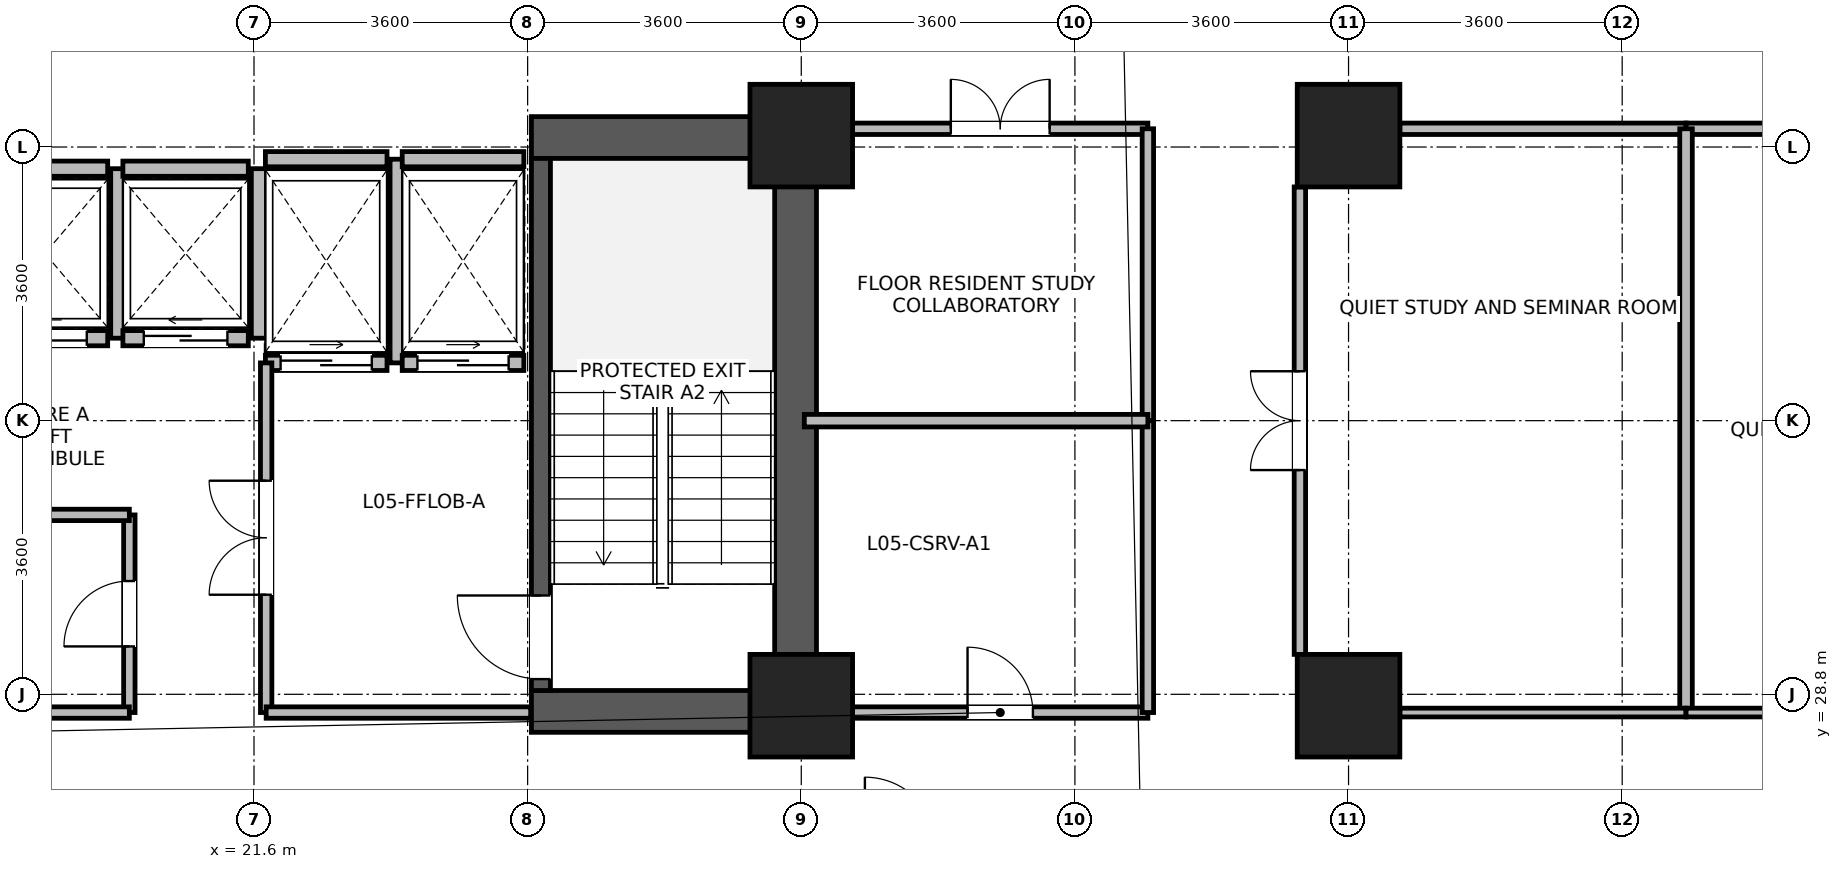
"""IFC4 building model, lengths in metres.
Left out: names, types, materials, properties, quantities, classifications, styles, units other than length and angle.
Written with IfcOpenShell. Run it as: python <this file> out.ifc"""

import sys

from ifc_helpers import new_model, si_unit, direction, frame, frame_2d, origin, origin_2d, place, context, subcontext, project, spatial, rectangle, extrude, source, transform, mapped, element, fill, save


model = new_model("IFC4")
c1 = context("Model", 3, precision=1e-05, world=origin(), true_north=direction((0.0, 1.0)))
c2 = subcontext(c1, "Body", "Model", "MODEL_VIEW")
j1 = project(units=[si_unit("LENGTHUNIT", "METRE"), si_unit("PLANEANGLEUNIT", "RADIAN")], contexts=[c1])
p1 = place(None, origin())
s1 = spatial("IfcSite", under=j1, at=p1, CompositionType="ELEMENT")
p2 = place(p1, origin())
s2 = spatial("IfcBuilding", under=s1, at=p2, CompositionType="ELEMENT")
p3 = place(p2, frame((0.0, 0.0, 25.3)))
s3 = spatial("IfcBuildingStorey", under=s2, at=p3, CompositionType="ELEMENT", Elevation=25.3)
p4 = place(p3, frame((28.725, 28.3, 0.0), z_axis=(0.0, 0.0, 1.0), x_axis=(0.0, 1.0, 0.0)))
e1 = element("IfcWall", 1, at=p4, inside=s3, PredefinedType="SHEAR", context=c2, shape_type="SweptSolid", body=[
    extrude(rectangle(XDim=8.1, YDim=0.55, at=frame_2d((4.05, 0.0))), origin(), (0.0, 0.0, 1.0), 3.45),
])
for number, where, z_axis, x_axis in (
    (2, (25.25, 28.575, 0.0), (0.0, 0.0, 1.0), (1.0, 0.0, 0.0)),
    (3, (25.25, 36.125, 0.0), (0.0, 0.0, 1.0), (1.0, 0.0, 0.0)),
):
    element("IfcWall", number, at=place(p3, frame(where, z_axis=z_axis, x_axis=x_axis)), inside=s3, PredefinedType="SHEAR", context=c2, shape_type="SweptSolid", body=[
        extrude(rectangle(XDim=3.2, YDim=0.55, at=frame_2d((1.6, 0.0))), origin(), (0.0, 0.0, 1.0), 3.45),
    ])
p5 = place(p3, frame((25.375, 28.85, 0.0), z_axis=(0.0, 0.0, 1.0), x_axis=(0.0, 1.0, 0.0)))
e4 = element("IfcWall", 4, at=p5, inside=s3, PredefinedType="SHEAR", context=c2, shape_type="SweptSolid", body=[
    extrude(rectangle(XDim=7.0, YDim=0.25, at=frame_2d((3.5, 0.0))), origin(), (0.0, 0.0, 1.0), 3.45),
])
p6 = place(p5, frame((0.15, 0.0, 0.0)))
e5 = element("IfcOpeningElement", 5, at=p6, cuts=e4, PredefinedType="OPENING", context=c2, shape_type="SweptSolid", body=[
    extrude(rectangle(XDim=1.1, YDim=2.08, at=frame_2d((0.55, 1.04))), frame((0.0, 0.135, 0.0), z_axis=(0.0, -1.0, 0.0), x_axis=(1.0, 0.0, 0.0)), (0.0, 0.0, 1.0), 0.27),
])
m1 = source(origin(), c2, "Body", "SweptSolid", [
    extrude(rectangle(XDim=1.35, YDim=1.35, at=origin_2d()), origin(), (0.0, 0.0, 1.0), 3.7),
])
for number, where, z_axis, x_axis in (
    (6, (28.8, 28.65, 0.0), (0.0, 0.0, 1.0), (1.0, 0.0, 0.0)),
    (7, (28.8, 36.15, 0.0), (0.0, 0.0, 1.0), (1.0, 0.0, 0.0)),
    (8, (36.0, 28.65, 0.0), (0.0, 0.0, 1.0), (1.0, 0.0, 0.0)),
    (9, (36.0, 36.15, 0.0), (0.0, 0.0, 1.0), (1.0, 0.0, 0.0)),
):
    element("IfcColumn", number, at=place(p3, frame(where, z_axis=z_axis, x_axis=x_axis)), inside=s3, PredefinedType="COLUMN", context=c2, shape_type="MappedRepresentation", body=[
        mapped(m1, transform((0.0, 0.0, 0.0), x_axis=(1.0, 0.0, 0.0), y_axis=(0.0, 1.0, 0.0), z_axis=(0.0, 0.0, 1.0), scale=1.0)),
    ])
p7 = place(p3, frame((18.025, 33.485, 0.0), z_axis=(0.0, 0.0, 1.0), x_axis=(1.0, 0.0, 0.0)))
e10 = element("IfcWall", 10, at=p7, inside=s3, PredefinedType="PARTITIONING", context=c2, shape_type="SweptSolid", body=[
    extrude(rectangle(XDim=1.65, YDim=0.2, at=frame_2d((0.825, 0.0))), origin(), (0.0, 0.0, 1.0), 3.43),
])
p8 = place(p7, frame((0.275, 0.0, 0.0)))
e11 = element("IfcOpeningElement", 11, at=p8, cuts=e10, PredefinedType="OPENING", context=c2, shape_type="SweptSolid", body=[
    extrude(rectangle(XDim=1.1, YDim=2.12, at=frame_2d((0.55, 1.06))), frame((0.0, 0.11, 0.0), z_axis=(0.0, -1.0, 0.0), x_axis=(1.0, 0.0, 0.0)), (0.0, 0.0, 1.0), 0.22),
])
p9 = place(p3, frame((18.025, 35.715, 0.0), z_axis=(0.0, 0.0, 1.0), x_axis=(1.0, 0.0, 0.0)))
e12 = element("IfcWall", 12, at=p9, inside=s3, PredefinedType="PARTITIONING", context=c2, shape_type="SweptSolid", body=[
    extrude(rectangle(XDim=1.65, YDim=0.2, at=frame_2d((0.825, 0.0))), origin(), (0.0, 0.0, 1.0), 2.23),
])
p10 = place(p3, frame((19.815, 33.485, 0.0), z_axis=(0.0, 0.0, 1.0), x_axis=(0.0, 1.0, 0.0)))
e13 = element("IfcWall", 13, at=p10, inside=s3, PredefinedType="PARTITIONING", context=c2, shape_type="SweptSolid", body=[
    extrude(rectangle(XDim=2.23, YDim=0.2, at=frame_2d((1.115, 0.0))), origin(), (0.0, 0.0, 1.0), 3.43),
])
p11 = place(p3, frame((19.875, 33.485, 0.0), z_axis=(0.0, 0.0, 1.0), x_axis=(1.0, 0.0, 0.0)))
e14 = element("IfcWall", 14, at=p11, inside=s3, PredefinedType="PARTITIONING", context=c2, shape_type="SweptSolid", body=[
    extrude(rectangle(XDim=1.65, YDim=0.2, at=frame_2d((0.825, 0.0))), origin(), (0.0, 0.0, 1.0), 3.43),
])
p12 = place(p11, frame((0.275, 0.0, 0.0)))
e15 = element("IfcOpeningElement", 15, at=p12, cuts=e14, PredefinedType="OPENING", context=c2, shape_type="SweptSolid", body=[
    extrude(rectangle(XDim=1.1, YDim=2.12, at=frame_2d((0.55, 1.06))), frame((0.0, 0.11, 0.0), z_axis=(0.0, -1.0, 0.0), x_axis=(1.0, 0.0, 0.0)), (0.0, 0.0, 1.0), 0.22),
])
p13 = place(p3, frame((19.875, 35.715, 0.0), z_axis=(0.0, 0.0, 1.0), x_axis=(1.0, 0.0, 0.0)))
e16 = element("IfcWall", 16, at=p13, inside=s3, PredefinedType="PARTITIONING", context=c2, shape_type="SweptSolid", body=[
    extrude(rectangle(XDim=1.65, YDim=0.2, at=frame_2d((0.825, 0.0))), origin(), (0.0, 0.0, 1.0), 2.23),
])
p14 = place(p3, frame((21.665, 33.485, 0.0), z_axis=(0.0, 0.0, 1.0), x_axis=(0.0, 1.0, 0.0)))
e17 = element("IfcWall", 17, at=p14, inside=s3, PredefinedType="PARTITIONING", context=c2, shape_type="SweptSolid", body=[
    extrude(rectangle(XDim=2.23, YDim=0.2, at=frame_2d((1.115, 0.0))), origin(), (0.0, 0.0, 1.0), 3.43),
])
p15 = place(p3, frame((21.75, 33.16, 0.0), z_axis=(0.0, 0.0, 1.0), x_axis=(1.0, 0.0, 0.0)))
e18 = element("IfcWall", 18, at=p15, inside=s3, PredefinedType="PARTITIONING", context=c2, shape_type="SweptSolid", body=[
    extrude(rectangle(XDim=1.6, YDim=0.2, at=frame_2d((0.8, 0.0))), origin(), (0.0, 0.0, 1.0), 3.43),
])
p16 = place(p15, frame((0.2, 0.0, 0.0)))
e19 = element("IfcOpeningElement", 19, at=p16, cuts=e18, PredefinedType="OPENING", context=c2, shape_type="SweptSolid", body=[
    extrude(rectangle(XDim=1.2, YDim=2.12, at=frame_2d((0.6, 1.06))), frame((0.0, 0.11, 0.0), z_axis=(0.0, -1.0, 0.0), x_axis=(1.0, 0.0, 0.0)), (0.0, 0.0, 1.0), 0.22),
])
p17 = place(p3, frame((21.75, 35.84, 0.0), z_axis=(0.0, 0.0, 1.0), x_axis=(1.0, 0.0, 0.0)))
e20 = element("IfcWall", 20, at=p17, inside=s3, PredefinedType="PARTITIONING", context=c2, shape_type="SweptSolid", body=[
    extrude(rectangle(XDim=1.6, YDim=0.2, at=frame_2d((0.8, 0.0))), origin(), (0.0, 0.0, 1.0), 2.23),
])
p18 = place(p3, frame((23.49, 33.16, 0.0), z_axis=(0.0, 0.0, 1.0), x_axis=(0.0, 1.0, 0.0)))
e21 = element("IfcWall", 21, at=p18, inside=s3, PredefinedType="PARTITIONING", context=c2, shape_type="SweptSolid", body=[
    extrude(rectangle(XDim=2.68, YDim=0.2, at=frame_2d((1.34, 0.0))), origin(), (0.0, 0.0, 1.0), 3.43),
])
p19 = place(p3, frame((23.55, 33.16, 0.0), z_axis=(0.0, 0.0, 1.0), x_axis=(1.0, 0.0, 0.0)))
e22 = element("IfcWall", 22, at=p19, inside=s3, PredefinedType="PARTITIONING", context=c2, shape_type="SweptSolid", body=[
    extrude(rectangle(XDim=1.6, YDim=0.2, at=frame_2d((0.8, 0.0))), origin(), (0.0, 0.0, 1.0), 3.43),
])
p20 = place(p19, frame((0.2, 0.0, 0.0)))
e23 = element("IfcOpeningElement", 23, at=p20, cuts=e22, PredefinedType="OPENING", context=c2, shape_type="SweptSolid", body=[
    extrude(rectangle(XDim=1.2, YDim=2.12, at=frame_2d((0.6, 1.06))), frame((0.0, 0.11, 0.0), z_axis=(0.0, -1.0, 0.0), x_axis=(1.0, 0.0, 0.0)), (0.0, 0.0, 1.0), 0.22),
])
p21 = place(p3, frame((23.55, 35.84, 0.0), z_axis=(0.0, 0.0, 1.0), x_axis=(1.0, 0.0, 0.0)))
e24 = element("IfcWall", 24, at=p21, inside=s3, PredefinedType="PARTITIONING", context=c2, shape_type="SweptSolid", body=[
    extrude(rectangle(XDim=1.6, YDim=0.2, at=frame_2d((0.8, 0.0))), origin(), (0.0, 0.0, 1.0), 2.23),
])
p22 = place(p3, frame((35.36, 29.325, 0.0), z_axis=(0.0, 0.0, 1.0), x_axis=(0.0, 1.0, 0.0)))
e25 = element("IfcWall", 25, at=p22, inside=s3, PredefinedType="PARTITIONING", context=c2, shape_type="SweptSolid", body=[
    extrude(rectangle(XDim=6.15, YDim=0.15, at=frame_2d((3.075, 0.0))), origin(), (0.0, 0.0, 1.0), 3.43),
])
p23 = place(p22, frame((2.425, 0.0, 0.0)))
e26 = element("IfcOpeningElement", 26, at=p23, cuts=e25, PredefinedType="OPENING", context=c2, shape_type="SweptSolid", body=[
    extrude(rectangle(XDim=1.3, YDim=2.12, at=frame_2d((0.65, 1.06))), frame((0.0, 0.085, 0.0), z_axis=(0.0, -1.0, 0.0), x_axis=(1.0, 0.0, 0.0)), (0.0, 0.0, 1.0), 0.17),
])
p24 = place(p3, frame((36.675, 36.24, 0.0), z_axis=(0.0, 0.0, 1.0), x_axis=(1.0, 0.0, 0.0)))
e27 = element("IfcWall", 27, at=p24, inside=s3, PredefinedType="PARTITIONING", context=c2, shape_type="SweptSolid", body=[
    extrude(rectangle(XDim=3.765, YDim=0.15, at=frame_2d((1.882, 0.0))), origin(), (0.0, 0.0, 1.0), 2.78),
])
p25 = place(p3, frame((40.44, 36.24, 0.0), z_axis=(0.0, 0.0, 1.0), x_axis=(1.0, 0.0, 0.0)))
e28 = element("IfcWall", 28, at=p25, inside=s3, PredefinedType="PARTITIONING", context=c2, shape_type="SweptSolid", body=[
    extrude(rectangle(XDim=4.72, YDim=0.15, at=frame_2d((2.36, 0.0))), origin(), (0.0, 0.0, 1.0), 2.78),
])
p26 = place(p25, frame((1.71, 0.0, 0.0)))
e29 = element("IfcOpeningElement", 29, at=p26, cuts=e28, PredefinedType="OPENING", context=c2, shape_type="SweptSolid", body=[
    extrude(rectangle(XDim=1.3, YDim=2.12, at=frame_2d((0.65, 1.06))), frame((0.0, 0.085, 0.0), z_axis=(0.0, -1.0, 0.0), x_axis=(1.0, 0.0, 0.0)), (0.0, 0.0, 1.0), 0.17),
])
p27 = place(p3, frame((29.475, 28.56, 0.0), z_axis=(0.0, 0.0, 1.0), x_axis=(1.0, 0.0, 0.0)))
e30 = element("IfcWall", 30, at=p27, inside=s3, PredefinedType="PARTITIONING", context=c2, shape_type="SweptSolid", body=[
    extrude(rectangle(XDim=3.885, YDim=0.15, at=frame_2d((1.942, 0.0))), origin(), (0.0, 0.0, 1.0), 2.78),
])
p28 = place(p27, frame((1.512, 0.0, 0.0)))
e31 = element("IfcOpeningElement", 31, at=p28, cuts=e30, PredefinedType="OPENING", context=c2, shape_type="SweptSolid", body=[
    extrude(rectangle(XDim=0.86, YDim=2.02, at=frame_2d((0.43, 1.01))), frame((0.0, 0.085, 0.0), z_axis=(0.0, -1.0, 0.0), x_axis=(1.0, 0.0, 0.0)), (0.0, 0.0, 1.0), 0.17),
])
p29 = place(p3, frame((29.475, 36.24, 0.0), z_axis=(0.0, 0.0, 1.0), x_axis=(1.0, 0.0, 0.0)))
e32 = element("IfcWall", 32, at=p29, inside=s3, PredefinedType="PARTITIONING", context=c2, shape_type="SweptSolid", body=[
    extrude(rectangle(XDim=3.885, YDim=0.15, at=frame_2d((1.942, 0.0))), origin(), (0.0, 0.0, 1.0), 2.78),
])
p30 = place(p29, frame((1.292, 0.0, 0.0)))
e33 = element("IfcOpeningElement", 33, at=p30, cuts=e32, PredefinedType="OPENING", context=c2, shape_type="SweptSolid", body=[
    extrude(rectangle(XDim=1.3, YDim=2.12, at=frame_2d((0.65, 1.06))), frame((0.0, 0.085, 0.0), z_axis=(0.0, -1.0, 0.0), x_axis=(1.0, 0.0, 0.0)), (0.0, 0.0, 1.0), 0.17),
])
p31 = place(p3, frame((33.36, 32.4, 0.0), z_axis=(0.0, 0.0, 1.0), x_axis=(0.0, 1.0, 0.0)))
e34 = element("IfcWall", 34, at=p31, inside=s3, PredefinedType="PARTITIONING", context=c2, shape_type="SweptSolid", body=[
    extrude(rectangle(XDim=3.84, YDim=0.15, at=frame_2d((1.92, 0.0))), origin(), (0.0, 0.0, 1.0), 3.43),
])
p32 = place(p3, frame((33.36, 28.56, 0.0), z_axis=(0.0, 0.0, 1.0), x_axis=(0.0, 1.0, 0.0)))
e35 = element("IfcWall", 35, at=p32, inside=s3, PredefinedType="PARTITIONING", context=c2, shape_type="SweptSolid", body=[
    extrude(rectangle(XDim=3.84, YDim=0.15, at=frame_2d((1.92, 0.0))), origin(), (0.0, 0.0, 1.0), 3.43),
])
p33 = place(p3, frame((19.96, 28.56, 0.0), z_axis=(0.0, 0.0, 1.0), x_axis=(0.0, 1.0, 0.0)))
e36 = element("IfcWall", 36, at=p33, inside=s3, PredefinedType="PARTITIONING", context=c2, shape_type="SweptSolid", body=[
    extrude(rectangle(XDim=2.6, YDim=0.15, at=frame_2d((1.3, 0.0))), origin(), (0.0, 0.0, 1.0), 3.43),
])
p34 = place(p33, frame((0.87, 0.0, 0.0)))
e37 = element("IfcOpeningElement", 37, at=p34, cuts=e36, PredefinedType="OPENING", context=c2, shape_type="SweptSolid", body=[
    extrude(rectangle(XDim=0.86, YDim=2.02, at=frame_2d((0.43, 1.01))), frame((0.0, 0.085, 0.0), z_axis=(0.0, -1.0, 0.0), x_axis=(1.0, 0.0, 0.0)), (0.0, 0.0, 1.0), 0.17),
])
p35 = place(p3, frame((17.96, 28.56, 0.0), z_axis=(0.0, 0.0, 1.0), x_axis=(1.0, 0.0, 0.0)))
e38 = element("IfcWall", 38, at=p35, inside=s3, PredefinedType="PARTITIONING", context=c2, shape_type="SweptSolid", body=[
    extrude(rectangle(XDim=2.0, YDim=0.15, at=frame_2d((1.0, 0.0))), origin(), (0.0, 0.0, 1.0), 2.23),
])
p36 = place(p3, frame((17.96, 31.16, 0.0), z_axis=(0.0, 0.0, 1.0), x_axis=(1.0, 0.0, 0.0)))
e39 = element("IfcWall", 39, at=p36, inside=s3, PredefinedType="PARTITIONING", context=c2, shape_type="SweptSolid", body=[
    extrude(rectangle(XDim=2.0, YDim=0.15, at=frame_2d((1.0, 0.0))), origin(), (0.0, 0.0, 1.0), 3.43),
])
p37 = place(p3, frame((40.44, 28.56, 0.0), z_axis=(0.0, 0.0, 1.0), x_axis=(0.0, 1.0, 0.0)))
e40 = element("IfcWall", 40, at=p37, inside=s3, PredefinedType="PARTITIONING", context=c2, shape_type="SweptSolid", body=[
    extrude(rectangle(XDim=7.68, YDim=0.165, at=frame_2d((3.84, 0.0))), origin(), (0.0, 0.0, 1.0), 3.43),
])
p38 = place(p3, frame((36.675, 28.56, 0.0), z_axis=(0.0, 0.0, 1.0), x_axis=(1.0, 0.0, 0.0)))
e41 = element("IfcWall", 41, at=p38, inside=s3, PredefinedType="PARTITIONING", context=c2, shape_type="SweptSolid", body=[
    extrude(rectangle(XDim=3.765, YDim=0.115, at=frame_2d((1.882, 0.0))), origin(), (0.0, 0.0, 1.0), 2.78),
])
p39 = place(p3, frame((40.44, 28.56, 0.0), z_axis=(0.0, 0.0, 1.0), x_axis=(1.0, 0.0, 0.0)))
e42 = element("IfcWall", 42, at=p39, inside=s3, PredefinedType="PARTITIONING", context=c2, shape_type="SweptSolid", body=[
    extrude(rectangle(XDim=4.72, YDim=0.115, at=frame_2d((2.36, 0.0))), origin(), (0.0, 0.0, 1.0), 2.78),
])
p40 = place(p3, frame((21.76, 28.56, 0.0), z_axis=(0.0, 0.0, 1.0), x_axis=(0.0, 1.0, 0.0)))
e43 = element("IfcWall", 43, at=p40, inside=s3, PredefinedType="PARTITIONING", context=c2, shape_type="SweptSolid", body=[
    extrude(rectangle(XDim=4.6, YDim=0.15, at=frame_2d((2.3, 0.0))), origin(), (0.0, 0.0, 1.0), 3.43),
])
p41 = place(p40, frame((1.55, 0.0, 0.0)))
e44 = element("IfcOpeningElement", 44, at=p41, cuts=e43, PredefinedType="OPENING", context=c2, shape_type="SweptSolid", body=[
    extrude(rectangle(XDim=1.5, YDim=2.1, at=frame_2d((0.75, 1.05))), frame((0.0, 0.085, 0.0), z_axis=(0.0, -1.0, 0.0), x_axis=(1.0, 0.0, 0.0)), (0.0, 0.0, 1.0), 0.17),
])
p42 = place(p3, frame((28.84, 32.4, 0.0), z_axis=(0.0, 0.0, 1.0), x_axis=(1.0, 0.0, 0.0)))
e45 = element("IfcWall", 45, at=p42, inside=s3, PredefinedType="PARTITIONING", context=c2, shape_type="SweptSolid", body=[
    extrude(rectangle(XDim=4.52, YDim=0.165, at=frame_2d((2.26, 0.0))), origin(), (0.0, 0.0, 1.0), 3.43),
])
p43 = place(p3, frame((21.76, 28.56, 0.0), z_axis=(0.0, 0.0, 1.0), x_axis=(1.0, 0.0, 0.0)))
e46 = element("IfcWall", 46, at=p43, inside=s3, PredefinedType="PARTITIONING", context=c2, shape_type="SweptSolid", body=[
    extrude(rectangle(XDim=3.48, YDim=0.15, at=frame_2d((1.74, 0.0))), origin(), (0.0, 0.0, 1.0), 2.23),
])
p44 = place(p6, origin())
e47 = element("IfcDoor", 47, at=p44, inside=s3, OperationType="SINGLE_SWING_RIGHT", PredefinedType="DOOR", context=c2, shape_type="SweptSolid", body=[
    extrude(rectangle(XDim=1.1, YDim=2.08, at=frame_2d((0.55, 1.04))), frame((0.0, 0.025, 0.0), z_axis=(0.0, -1.0, 0.0), x_axis=(1.0, 0.0, 0.0)), (0.0, 0.0, 1.0), 0.05),
])
fill(e5, e47)
p45 = place(p8, origin())
e48 = element("IfcDoor", 48, at=p45, inside=s3, OperationType="SLIDING_TO_LEFT", PredefinedType="DOOR", context=c2, shape_type="SweptSolid", body=[
    extrude(rectangle(XDim=1.1, YDim=2.12, at=frame_2d((0.55, 1.06))), frame((0.0, 0.025, 0.0), z_axis=(0.0, -1.0, 0.0), x_axis=(1.0, 0.0, 0.0)), (0.0, 0.0, 1.0), 0.05),
])
fill(e11, e48)
p46 = place(p12, origin())
e49 = element("IfcDoor", 49, at=p46, inside=s3, OperationType="SLIDING_TO_LEFT", PredefinedType="DOOR", context=c2, shape_type="SweptSolid", body=[
    extrude(rectangle(XDim=1.1, YDim=2.12, at=frame_2d((0.55, 1.06))), frame((0.0, 0.025, 0.0), z_axis=(0.0, -1.0, 0.0), x_axis=(1.0, 0.0, 0.0)), (0.0, 0.0, 1.0), 0.05),
])
fill(e15, e49)
p47 = place(p16, origin())
e50 = element("IfcDoor", 50, at=p47, inside=s3, OperationType="SLIDING_TO_RIGHT", PredefinedType="DOOR", context=c2, shape_type="SweptSolid", body=[
    extrude(rectangle(XDim=1.2, YDim=2.12, at=frame_2d((0.6, 1.06))), frame((0.0, 0.025, 0.0), z_axis=(0.0, -1.0, 0.0), x_axis=(1.0, 0.0, 0.0)), (0.0, 0.0, 1.0), 0.05),
])
fill(e19, e50)
p48 = place(p20, origin())
e51 = element("IfcDoor", 51, at=p48, inside=s3, OperationType="SLIDING_TO_RIGHT", PredefinedType="DOOR", context=c2, shape_type="SweptSolid", body=[
    extrude(rectangle(XDim=1.2, YDim=2.12, at=frame_2d((0.6, 1.06))), frame((0.0, 0.025, 0.0), z_axis=(0.0, -1.0, 0.0), x_axis=(1.0, 0.0, 0.0)), (0.0, 0.0, 1.0), 0.05),
])
fill(e23, e51)
p49 = place(p23, origin())
e52 = element("IfcDoor", 52, at=p49, inside=s3, OperationType="DOUBLE_DOOR_SINGLE_SWING", PredefinedType="DOOR", context=c2, shape_type="SweptSolid", body=[
    extrude(rectangle(XDim=1.3, YDim=2.12, at=frame_2d((0.65, 1.06))), frame((0.0, 0.025, 0.0), z_axis=(0.0, -1.0, 0.0), x_axis=(1.0, 0.0, 0.0)), (0.0, 0.0, 1.0), 0.05),
])
fill(e26, e52)
p50 = place(p28, origin())
e53 = element("IfcDoor", 53, at=p50, inside=s3, OperationType="SINGLE_SWING_LEFT", PredefinedType="DOOR", context=c2, shape_type="SweptSolid", body=[
    extrude(rectangle(XDim=0.86, YDim=2.02, at=frame_2d((0.43, 1.01))), frame((0.0, 0.025, 0.0), z_axis=(0.0, -1.0, 0.0), x_axis=(1.0, 0.0, 0.0)), (0.0, 0.0, 1.0), 0.05),
])
fill(e31, e53)
p51 = place(p30, origin())
e54 = element("IfcDoor", 54, at=p51, inside=s3, OperationType="DOUBLE_DOOR_SINGLE_SWING", PredefinedType="DOOR", context=c2, shape_type="SweptSolid", body=[
    extrude(rectangle(XDim=1.3, YDim=2.12, at=frame_2d((0.65, 1.06))), frame((0.0, 0.025, 0.0), z_axis=(0.0, -1.0, 0.0), x_axis=(1.0, 0.0, 0.0)), (0.0, 0.0, 1.0), 0.05),
])
fill(e33, e54)
p52 = place(p34, origin())
e55 = element("IfcDoor", 55, at=p52, inside=s3, OperationType="SINGLE_SWING_LEFT", PredefinedType="DOOR", context=c2, shape_type="SweptSolid", body=[
    extrude(rectangle(XDim=0.86, YDim=2.02, at=frame_2d((0.43, 1.01))), frame((0.0, 0.025, 0.0), z_axis=(0.0, -1.0, 0.0), x_axis=(1.0, 0.0, 0.0)), (0.0, 0.0, 1.0), 0.05),
])
fill(e37, e55)
p53 = place(p41, origin())
e56 = element("IfcDoor", 56, at=p53, inside=s3, OperationType="DOUBLE_DOOR_SINGLE_SWING", PredefinedType="DOOR", context=c2, shape_type="SweptSolid", body=[
    extrude(rectangle(XDim=1.5, YDim=2.1, at=frame_2d((0.75, 1.05))), frame((0.0, 0.025, 0.0), z_axis=(0.0, -1.0, 0.0), x_axis=(1.0, 0.0, 0.0)), (0.0, 0.0, 1.0), 0.05),
])
fill(e44, e56)
save(model, sys.argv[1])
